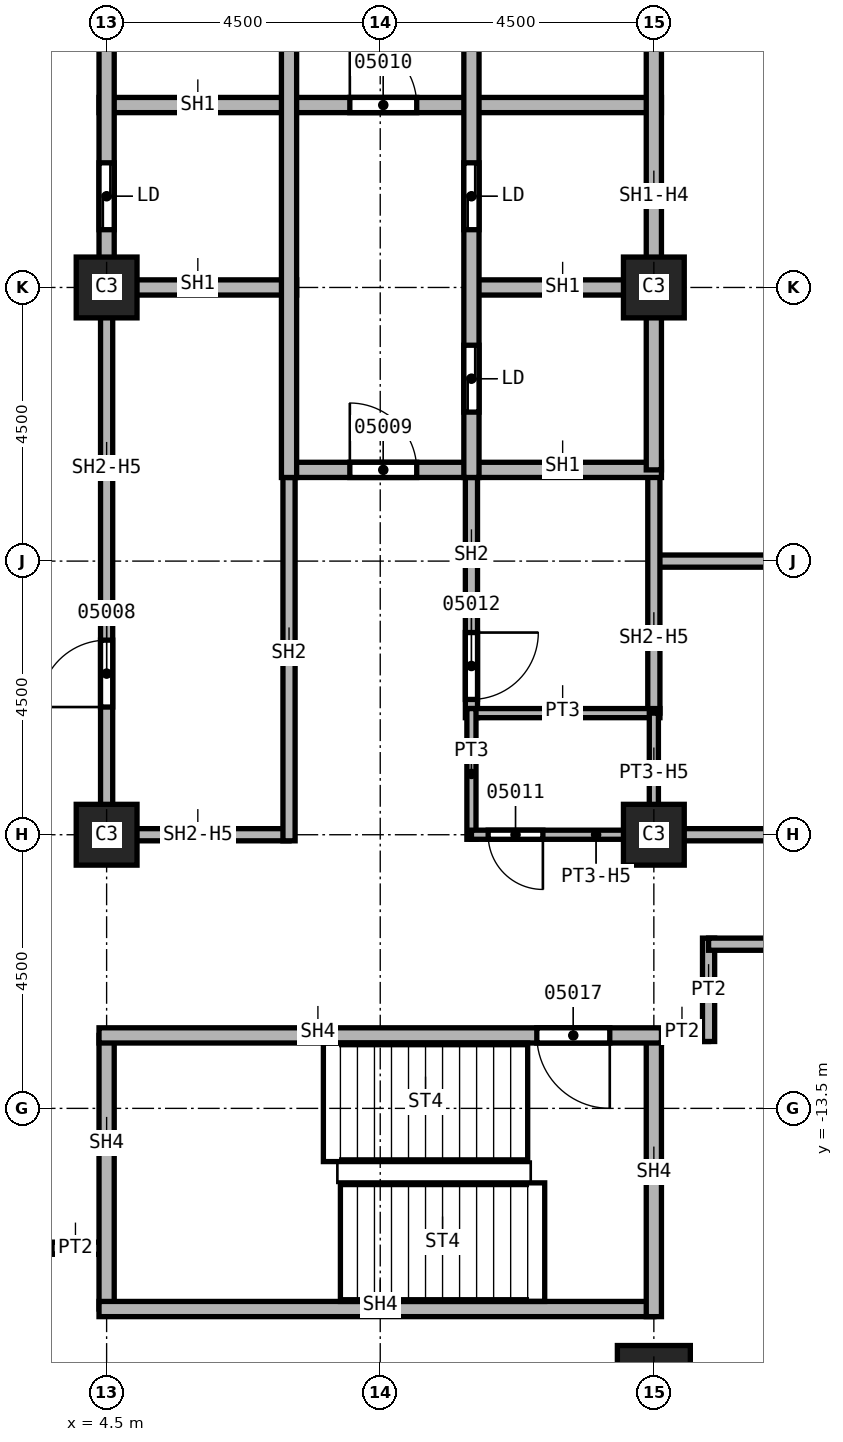
"""IFC4 building model, lengths in metres.
Left out: names, types, materials, properties, quantities, classifications, styles, units other than length and angle.
Written with IfcOpenShell. Run it as: python <this file> out.ifc"""

import sys

from ifc_helpers import new_model, si_unit, direction, frame, frame_2d, origin, origin_2d, place, context, subcontext, project, spatial, rectangle, extrude, element, fill, save


model = new_model("IFC4")
c1 = context("Model", 3, precision=1e-05, world=origin(), true_north=direction((0.0, 1.0)))
c2 = subcontext(c1, "Body", "Model", "MODEL_VIEW")
j1 = project(units=[si_unit("LENGTHUNIT", "METRE"), si_unit("PLANEANGLEUNIT", "RADIAN")], contexts=[c1])
p1 = place(None, origin())
s1 = spatial("IfcSite", under=j1, at=p1, CompositionType="ELEMENT")
p2 = place(p1, origin())
s2 = spatial("IfcBuilding", under=s1, at=p2, CompositionType="ELEMENT")
p3 = place(p2, frame((0.0, 0.0, 116.0)))
s3 = spatial("IfcBuildingStorey", under=s2, at=p3, CompositionType="ELEMENT", Elevation=116.0)
p4 = place(p3, frame((13.5, -18.0, 0.0), z_axis=(0.0, 0.0, 1.0), x_axis=(1.0, 0.0, 0.0)))
e1 = element("IfcColumn", 1, at=p4, inside=s3, PredefinedType="COLUMN", context=c2, shape_type="SweptSolid", body=[
    extrude(rectangle(XDim=1.2, YDim=1.2, at=origin_2d()), origin(), (0.0, 0.0, 1.0), 3.6),
])
for number, where, z_axis, x_axis in (
    (2, (4.5, 0.0, 0.0), (0.0, 0.0, 1.0), (1.0, 0.0, 0.0)),
    (3, (4.5, -9.0, 0.0), (0.0, 0.0, 1.0), (1.0, 0.0, 0.0)),
    (4, (13.5, 0.0, 0.0), (0.0, 0.0, 1.0), (1.0, 0.0, 0.0)),
    (5, (13.5, -9.0, 0.0), (0.0, 0.0, 1.0), (1.0, 0.0, 0.0)),
):
    element("IfcColumn", number, at=place(p3, frame(where, z_axis=z_axis, x_axis=x_axis)), inside=s3, PredefinedType="COLUMN", context=c2, shape_type="SweptSolid", body=[
        extrude(rectangle(XDim=1.0, YDim=1.0, at=origin_2d()), origin(), (0.0, 0.0, 1.0), 3.6),
    ])
p5 = place(p3, frame((4.5, -15.8, 0.0), z_axis=(0.0, 0.0, 1.0), x_axis=(-1.0, 0.0, 0.0)))
e6 = element("IfcWall", 6, at=p5, inside=s3, PredefinedType="PARTITIONING", context=c2, shape_type="SweptSolid", body=[
    extrude(rectangle(XDim=0.9, YDim=0.2, at=frame_2d((0.45, 0.0))), origin(), (0.0, 0.0, 1.0), 3.6),
])
for number, where, z_axis, x_axis in (
    (7, (13.5, -9.0, 0.0), (0.0, 0.0, 1.0), (1.0, 0.0, 0.0)),
    (8, (13.5, -4.5, 0.0), (0.0, 0.0, 1.0), (1.0, 0.0, 0.0)),
):
    element("IfcWall", number, at=place(p3, frame(where, z_axis=z_axis, x_axis=x_axis)), inside=s3, PredefinedType="PARTITIONING", context=c2, shape_type="SweptSolid", body=[
        extrude(rectangle(XDim=4.5, YDim=0.2, at=frame_2d((2.25, 0.0))), origin(), (0.0, 0.0, 1.0), 3.6),
    ])
p6 = place(p3, frame((14.4, -12.3, 0.0), z_axis=(0.0, 0.0, 1.0), x_axis=(-1.0, 0.0, 0.0)))
e9 = element("IfcWall", 9, at=p6, inside=s3, PredefinedType="PARTITIONING", context=c2, shape_type="SweptSolid", body=[
    extrude(rectangle(XDim=1.025, YDim=0.2, at=frame_2d((0.512, 0.0))), origin(), (0.0, 0.0, 1.0), 3.6),
])
p7 = place(p3, frame((14.4, -10.7, 0.0), z_axis=(0.0, 0.0, 1.0), x_axis=(0.0, -1.0, 0.0)))
e10 = element("IfcWall", 10, at=p7, inside=s3, PredefinedType="PARTITIONING", context=c2, shape_type="SweptSolid", body=[
    extrude(rectangle(XDim=1.7, YDim=0.2, at=frame_2d((0.85, 0.0))), origin(), (0.0, 0.0, 1.0), 3.6),
])
p8 = place(p3, frame((18.0, -10.8, 0.0), z_axis=(0.0, 0.0, 1.0), x_axis=(-1.0, 0.0, 0.0)))
e11 = element("IfcWall", 11, at=p8, inside=s3, PredefinedType="PARTITIONING", context=c2, shape_type="SweptSolid", body=[
    extrude(rectangle(XDim=3.6, YDim=0.2, at=frame_2d((1.8, 0.0))), origin(), (0.0, 0.0, 1.0), 3.6),
])
p9 = place(p3, frame((4.5, -9.1, 0.0), z_axis=(0.0, 0.0, 1.0), x_axis=(0.0, 1.0, 0.0)))
e12 = element("IfcWall", 12, at=p9, inside=s3, PredefinedType="SOLIDWALL", context=c2, shape_type="SweptSolid", body=[
    extrude(rectangle(XDim=9.1, YDim=0.2, at=frame_2d((4.55, 0.0))), origin(), (0.0, 0.0, 1.0), 2.838),
])
p10 = place(p9, frame((2.2, 0.0, 0.0)))
e13 = element("IfcOpeningElement", 13, at=p10, cuts=e12, PredefinedType="OPENING", context=c2, shape_type="SweptSolid", body=[
    extrude(rectangle(XDim=1.1, YDim=2.1, at=frame_2d((0.55, 1.05))), frame((0.0, 0.1, 0.0), z_axis=(0.0, -1.0, 0.0), x_axis=(1.0, 0.0, 0.0)), (0.0, 0.0, 1.0), 0.2),
])
p11 = place(p3, frame((7.5, -9.0, 0.0), z_axis=(0.0, 0.0, 1.0), x_axis=(-1.0, 0.0, 0.0)))
e14 = element("IfcWall", 14, at=p11, inside=s3, PredefinedType="SOLIDWALL", context=c2, shape_type="SweptSolid", body=[
    extrude(rectangle(XDim=3.0, YDim=0.2, at=frame_2d((1.5, 0.0))), origin(), (0.0, 0.0, 1.0), 2.838),
])
p12 = place(p3, frame((7.5, -2.875, 0.0), z_axis=(0.0, 0.0, 1.0), x_axis=(0.0, -1.0, 0.0)))
e15 = element("IfcWall", 15, at=p12, inside=s3, PredefinedType="SOLIDWALL", context=c2, shape_type="SweptSolid", body=[
    extrude(rectangle(XDim=6.225, YDim=0.2, at=frame_2d((3.113, 0.0))), origin(), (0.0, 0.0, 1.0), 3.6),
])
p13 = place(p3, frame((10.5, -2.875, 0.0), z_axis=(0.0, 0.0, 1.0), x_axis=(0.0, -1.0, 0.0)))
e16 = element("IfcWall", 16, at=p13, inside=s3, PredefinedType="SOLIDWALL", context=c2, shape_type="SweptSolid", body=[
    extrude(rectangle(XDim=4.2, YDim=0.2, at=frame_2d((2.1, 0.0))), origin(), (0.0, 0.0, 1.0), 3.6),
])
p14 = place(p13, frame((2.8, 0.0, 0.0)))
e17 = element("IfcOpeningElement", 17, at=p14, cuts=e16, PredefinedType="OPENING", context=c2, shape_type="SweptSolid", body=[
    extrude(rectangle(XDim=1.1, YDim=2.1, at=frame_2d((0.55, 1.05))), frame((0.0, 0.1, 0.0), z_axis=(0.0, -1.0, 0.0), x_axis=(1.0, 0.0, 0.0)), (0.0, 0.0, 1.0), 0.2),
])
p15 = place(p3, frame((13.5, -3.0, 0.0), z_axis=(0.0, 0.0, 1.0), x_axis=(0.0, -1.0, 0.0)))
e18 = element("IfcWall", 18, at=p15, inside=s3, PredefinedType="SOLIDWALL", context=c2, shape_type="SweptSolid", body=[
    extrude(rectangle(XDim=4.0, YDim=0.2, at=frame_2d((2.0, 0.0))), origin(), (0.0, 0.0, 1.0), 2.838),
])
p16 = place(p3, frame((4.375, 0.0, 0.0), z_axis=(0.0, 0.0, 1.0), x_axis=(1.0, 0.0, 0.0)))
e19 = element("IfcWall", 19, at=p16, inside=s3, PredefinedType="SOLIDWALL", context=c2, shape_type="SweptSolid", body=[
    extrude(rectangle(XDim=3.25, YDim=0.25, at=frame_2d((1.625, 0.0))), origin(), (0.0, 0.0, 1.0), 3.6),
])
p17 = place(p3, frame((4.375, 3.0, 0.0), z_axis=(0.0, 0.0, 1.0), x_axis=(1.0, 0.0, 0.0)))
e20 = element("IfcWall", 20, at=p17, inside=s3, PredefinedType="SOLIDWALL", context=c2, shape_type="SweptSolid", body=[
    extrude(rectangle(XDim=9.25, YDim=0.25, at=frame_2d((4.625, 0.0))), origin(), (0.0, 0.0, 1.0), 3.6),
])
p18 = place(p17, frame((4.125, 0.0, 0.0)))
e21 = element("IfcOpeningElement", 21, at=p18, cuts=e20, PredefinedType="OPENING", context=c2, shape_type="SweptSolid", body=[
    extrude(rectangle(XDim=1.1, YDim=2.1, at=frame_2d((0.55, 1.05))), frame((0.0, 0.125, 0.0), z_axis=(0.0, -1.0, 0.0), x_axis=(1.0, 0.0, 0.0)), (0.0, 0.0, 1.0), 0.25),
])
p19 = place(p3, frame((4.5, 0.0, 0.0), z_axis=(0.0, 0.0, 1.0), x_axis=(0.0, 1.0, 0.0)))
e22 = element("IfcWall", 22, at=p19, inside=s3, PredefinedType="SOLIDWALL", context=c2, shape_type="SweptSolid", body=[
    extrude(rectangle(XDim=9.125, YDim=0.25, at=frame_2d((4.562, 0.0))), origin(), (0.0, 0.0, 1.0), 2.838),
])
p20 = place(p19, frame((0.95, 0.0, 0.0)))
e23 = element("IfcOpeningElement", 23, at=p20, cuts=e22, PredefinedType="OPENING", context=c2, shape_type="SweptSolid", body=[
    extrude(rectangle(XDim=1.1, YDim=2.1, at=frame_2d((0.55, 1.05))), frame((0.0, 0.125, 0.0), z_axis=(0.0, -1.0, 0.0), x_axis=(1.0, 0.0, 0.0)), (0.0, 0.0, 1.0), 0.25),
])
p21 = place(p19, frame((3.95, 0.0, 0.0)))
e24 = element("IfcOpeningElement", 24, at=p21, cuts=e22, PredefinedType="OPENING", context=c2, shape_type="SweptSolid", body=[
    extrude(rectangle(XDim=1.1, YDim=2.1, at=frame_2d((0.55, 1.05))), frame((0.0, 0.125, 0.0), z_axis=(0.0, -1.0, 0.0), x_axis=(1.0, 0.0, 0.0)), (0.0, 0.0, 1.0), 0.25),
])
p22 = place(p19, frame((7.012, 0.0, 0.0)))
e25 = element("IfcOpeningElement", 25, at=p22, cuts=e22, PredefinedType="OPENING", context=c2, shape_type="SweptSolid", body=[
    extrude(rectangle(XDim=1.1, YDim=2.1, at=frame_2d((0.55, 1.05))), frame((0.0, 0.125, 0.0), z_axis=(0.0, -1.0, 0.0), x_axis=(1.0, 0.0, 0.0)), (0.0, 0.0, 1.0), 0.25),
])
p23 = place(p3, frame((7.5, -3.0, 0.0), z_axis=(0.0, 0.0, 1.0), x_axis=(1.0, 0.0, 0.0)))
e26 = element("IfcWall", 26, at=p23, inside=s3, PredefinedType="SOLIDWALL", context=c2, shape_type="SweptSolid", body=[
    extrude(rectangle(XDim=6.125, YDim=0.25, at=frame_2d((3.062, 0.0))), origin(), (0.0, 0.0, 1.0), 3.6),
])
p24 = place(p23, frame((1.0, 0.0, 0.0)))
e27 = element("IfcOpeningElement", 27, at=p24, cuts=e26, PredefinedType="OPENING", context=c2, shape_type="SweptSolid", body=[
    extrude(rectangle(XDim=1.1, YDim=2.1, at=frame_2d((0.55, 1.05))), frame((0.0, 0.125, 0.0), z_axis=(0.0, -1.0, 0.0), x_axis=(1.0, 0.0, 0.0)), (0.0, 0.0, 1.0), 0.25),
])
p25 = place(p3, frame((7.5, 9.125, 0.0), z_axis=(0.0, 0.0, 1.0), x_axis=(0.0, -1.0, 0.0)))
e28 = element("IfcWall", 28, at=p25, inside=s3, PredefinedType="SOLIDWALL", context=c2, shape_type="SweptSolid", body=[
    extrude(rectangle(XDim=12.25, YDim=0.25, at=frame_2d((6.125, 0.0))), origin(), (0.0, 0.0, 1.0), 3.6),
])
p26 = place(p3, frame((10.5, 0.0, 0.0), z_axis=(0.0, 0.0, 1.0), x_axis=(1.0, 0.0, 0.0)))
e29 = element("IfcWall", 29, at=p26, inside=s3, PredefinedType="SOLIDWALL", context=c2, shape_type="SweptSolid", body=[
    extrude(rectangle(XDim=3.125, YDim=0.25, at=frame_2d((1.562, 0.0))), origin(), (0.0, 0.0, 1.0), 3.6),
])
p27 = place(p3, frame((10.5, 6.125, 0.0), z_axis=(0.0, 0.0, 1.0), x_axis=(0.0, -1.0, 0.0)))
e30 = element("IfcWall", 30, at=p27, inside=s3, PredefinedType="SOLIDWALL", context=c2, shape_type="SweptSolid", body=[
    extrude(rectangle(XDim=9.25, YDim=0.25, at=frame_2d((4.625, 0.0))), origin(), (0.0, 0.0, 1.0), 3.6),
])
p28 = place(p27, frame((7.075, 0.0, 0.0)))
e31 = element("IfcOpeningElement", 31, at=p28, cuts=e30, PredefinedType="OPENING", context=c2, shape_type="SweptSolid", body=[
    extrude(rectangle(XDim=1.1, YDim=2.1, at=frame_2d((0.55, 1.05))), frame((0.0, 0.125, 0.0), z_axis=(0.0, -1.0, 0.0), x_axis=(1.0, 0.0, 0.0)), (0.0, 0.0, 1.0), 0.25),
])
p29 = place(p27, frame((4.075, 0.0, 0.0)))
e32 = element("IfcOpeningElement", 32, at=p29, cuts=e30, PredefinedType="OPENING", context=c2, shape_type="SweptSolid", body=[
    extrude(rectangle(XDim=1.1, YDim=2.1, at=frame_2d((0.55, 1.05))), frame((0.0, 0.125, 0.0), z_axis=(0.0, -1.0, 0.0), x_axis=(1.0, 0.0, 0.0)), (0.0, 0.0, 1.0), 0.25),
])
p30 = place(p3, frame((13.5, 6.0, 0.0), z_axis=(0.0, 0.0, 1.0), x_axis=(0.0, -1.0, 0.0)))
e33 = element("IfcWall", 33, at=p30, inside=s3, PredefinedType="SOLIDWALL", context=c2, shape_type="SweptSolid", body=[
    extrude(rectangle(XDim=9.0, YDim=0.25, at=frame_2d((4.5, 0.0))), origin(), (0.0, 0.0, 1.0), 2.838),
])
p31 = place(p3, frame((4.5, -16.8, 0.0), z_axis=(0.0, 0.0, 1.0), x_axis=(0.0, 1.0, 0.0)))
e34 = element("IfcWall", 34, at=p31, inside=s3, PredefinedType="SOLIDWALL", context=c2, shape_type="SweptSolid", body=[
    extrude(rectangle(XDim=4.5, YDim=0.25, at=frame_2d((2.25, 0.0))), origin(), (0.0, 0.0, 1.0), 3.6),
])
p32 = place(p3, frame((13.5, -16.8, 0.0), z_axis=(0.0, 0.0, 1.0), x_axis=(-1.0, 0.0, 0.0)))
e35 = element("IfcWall", 35, at=p32, inside=s3, PredefinedType="SOLIDWALL", context=c2, shape_type="SweptSolid", body=[
    extrude(rectangle(XDim=9.125, YDim=0.25, at=frame_2d((4.562, 0.0))), origin(), (0.0, 0.0, 1.0), 3.6),
])
p33 = place(p3, frame((13.5, -12.3, 0.0), z_axis=(0.0, 0.0, 1.0), x_axis=(0.0, -1.0, 0.0)))
e36 = element("IfcWall", 36, at=p33, inside=s3, PredefinedType="SOLIDWALL", context=c2, shape_type="SweptSolid", body=[
    extrude(rectangle(XDim=4.625, YDim=0.25, at=frame_2d((2.312, 0.0))), origin(), (0.0, 0.0, 1.0), 3.6),
])
p34 = place(p3, frame((13.625, -12.3, 0.0), z_axis=(0.0, 0.0, 1.0), x_axis=(-1.0, 0.0, 0.0)))
e37 = element("IfcWall", 37, at=p34, inside=s3, PredefinedType="SOLIDWALL", context=c2, shape_type="SweptSolid", body=[
    extrude(rectangle(XDim=9.25, YDim=0.25, at=frame_2d((4.625, 0.0))), origin(), (0.0, 0.0, 1.0), 3.6),
])
p35 = place(p34, frame((0.85, 0.0, 0.0)))
e38 = element("IfcOpeningElement", 38, at=p35, cuts=e37, PredefinedType="OPENING", context=c2, shape_type="SweptSolid", body=[
    extrude(rectangle(XDim=1.2, YDim=2.1, at=frame_2d((0.6, 1.05))), frame((0.0, 0.125, 0.0), z_axis=(0.0, -1.0, 0.0), x_axis=(1.0, 0.0, 0.0)), (0.0, 0.0, 1.0), 0.25),
])
p36 = place(p3, frame((10.5, -7.0, 0.0), z_axis=(0.0, 0.0, 1.0), x_axis=(1.0, 0.0, 0.0)))
e39 = element("IfcWall", 39, at=p36, inside=s3, PredefinedType="PARTITIONING", context=c2, shape_type="SweptSolid", body=[
    extrude(rectangle(XDim=3.1, YDim=0.15, at=frame_2d((1.55, 0.0))), origin(), (0.0, 0.0, 1.0), 3.6),
])
p37 = place(p3, frame((10.5, -6.925, 0.0), z_axis=(0.0, 0.0, 1.0), x_axis=(0.0, -1.0, 0.0)))
e40 = element("IfcWall", 40, at=p37, inside=s3, PredefinedType="PARTITIONING", context=c2, shape_type="SweptSolid", body=[
    extrude(rectangle(XDim=2.15, YDim=0.15, at=frame_2d((1.075, 0.0))), origin(), (0.0, 0.0, 1.0), 3.6),
])
p38 = place(p3, frame((13.5, -7.0, 0.0), z_axis=(0.0, 0.0, 1.0), x_axis=(0.0, -1.0, 0.0)))
e41 = element("IfcWall", 41, at=p38, inside=s3, PredefinedType="PARTITIONING", context=c2, shape_type="SweptSolid", body=[
    extrude(rectangle(XDim=2.1, YDim=0.15, at=frame_2d((1.05, 0.0))), origin(), (0.0, 0.0, 1.0), 2.838),
])
p39 = place(p3, frame((13.575, -9.0, 0.0), z_axis=(0.0, 0.0, 1.0), x_axis=(-1.0, 0.0, 0.0)))
e42 = element("IfcWall", 42, at=p39, inside=s3, PredefinedType="PARTITIONING", context=c2, shape_type="SweptSolid", body=[
    extrude(rectangle(XDim=3.075, YDim=0.15, at=frame_2d((1.538, 0.0))), origin(), (0.0, 0.0, 1.0), 2.838),
])
p40 = place(p39, frame((1.9, 0.0, 0.0)))
e43 = element("IfcOpeningElement", 43, at=p40, cuts=e42, PredefinedType="OPENING", context=c2, shape_type="SweptSolid", body=[
    extrude(rectangle(XDim=0.9, YDim=2.1, at=frame_2d((0.45, 1.05))), frame((0.0, 0.075, 0.0), z_axis=(0.0, -1.0, 0.0), x_axis=(1.0, 0.0, 0.0)), (0.0, 0.0, 1.0), 0.15),
])
p41 = place(p10, origin())
e44 = element("IfcDoor", 44, at=p41, inside=s3, OperationType="SINGLE_SWING_LEFT", PredefinedType="DOOR", context=c2, shape_type="SweptSolid", body=[
    extrude(rectangle(XDim=1.1, YDim=2.1, at=frame_2d((0.55, 1.05))), frame((0.0, 0.025, 0.0), z_axis=(0.0, -1.0, 0.0), x_axis=(1.0, 0.0, 0.0)), (0.0, 0.0, 1.0), 0.05),
])
fill(e13, e44)
p42 = place(p24, origin())
e45 = element("IfcDoor", 45, at=p42, inside=s3, OperationType="SINGLE_SWING_RIGHT", PredefinedType="DOOR", context=c2, shape_type="SweptSolid", body=[
    extrude(rectangle(XDim=1.1, YDim=2.1, at=frame_2d((0.55, 1.05))), frame((0.0, 0.025, 0.0), z_axis=(0.0, -1.0, 0.0), x_axis=(1.0, 0.0, 0.0)), (0.0, 0.0, 1.0), 0.05),
])
fill(e27, e45)
p43 = place(p18, origin())
e46 = element("IfcDoor", 46, at=p43, inside=s3, OperationType="SINGLE_SWING_LEFT", PredefinedType="DOOR", context=c2, shape_type="SweptSolid", body=[
    extrude(rectangle(XDim=1.1, YDim=2.1, at=frame_2d((0.55, 1.05))), frame((0.0, 0.025, 0.0), z_axis=(0.0, -1.0, 0.0), x_axis=(1.0, 0.0, 0.0)), (0.0, 0.0, 1.0), 0.05),
])
fill(e21, e46)
p44 = place(p40, origin())
e47 = element("IfcDoor", 47, at=p44, inside=s3, OperationType="SINGLE_SWING_RIGHT", PredefinedType="DOOR", context=c2, shape_type="SweptSolid", body=[
    extrude(rectangle(XDim=0.9, YDim=2.1, at=frame_2d((0.45, 1.05))), frame((0.0, 0.025, 0.0), z_axis=(0.0, -1.0, 0.0), x_axis=(1.0, 0.0, 0.0)), (0.0, 0.0, 1.0), 0.05),
])
fill(e43, e47)
p45 = place(p14, origin())
e48 = element("IfcDoor", 48, at=p45, inside=s3, OperationType="SINGLE_SWING_LEFT", PredefinedType="DOOR", context=c2, shape_type="SweptSolid", body=[
    extrude(rectangle(XDim=1.1, YDim=2.1, at=frame_2d((0.55, 1.05))), frame((0.0, 0.025, 0.0), z_axis=(0.0, -1.0, 0.0), x_axis=(1.0, 0.0, 0.0)), (0.0, 0.0, 1.0), 0.05),
])
fill(e17, e48)
p46 = place(p35, origin())
e49 = element("IfcDoor", 49, at=p46, inside=s3, OperationType="SINGLE_SWING_RIGHT", PredefinedType="DOOR", context=c2, shape_type="SweptSolid", body=[
    extrude(rectangle(XDim=1.2, YDim=2.1, at=frame_2d((0.6, 1.05))), frame((0.0, 0.025, 0.0), z_axis=(0.0, -1.0, 0.0), x_axis=(1.0, 0.0, 0.0)), (0.0, 0.0, 1.0), 0.05),
])
fill(e38, e49)
p47 = place(p20, origin())
e50 = element("IfcDoor", 50, at=p47, inside=s3, OperationType="SLIDING_TO_LEFT", PredefinedType="DOOR", context=c2, shape_type="SweptSolid", body=[
    extrude(rectangle(XDim=1.1, YDim=2.1, at=frame_2d((0.55, 1.05))), frame((0.0, 0.025, 0.0), z_axis=(0.0, -1.0, 0.0), x_axis=(1.0, 0.0, 0.0)), (0.0, 0.0, 1.0), 0.05),
])
fill(e23, e50)
p48 = place(p28, origin())
e51 = element("IfcDoor", 51, at=p48, inside=s3, OperationType="SLIDING_TO_LEFT", PredefinedType="DOOR", context=c2, shape_type="SweptSolid", body=[
    extrude(rectangle(XDim=1.1, YDim=2.1, at=frame_2d((0.55, 1.05))), frame((0.0, 0.025, 0.0), z_axis=(0.0, -1.0, 0.0), x_axis=(1.0, 0.0, 0.0)), (0.0, 0.0, 1.0), 0.05),
])
fill(e31, e51)
p49 = place(p29, origin())
e52 = element("IfcDoor", 52, at=p49, inside=s3, OperationType="SLIDING_TO_LEFT", PredefinedType="DOOR", context=c2, shape_type="SweptSolid", body=[
    extrude(rectangle(XDim=1.1, YDim=2.1, at=frame_2d((0.55, 1.05))), frame((0.0, 0.025, 0.0), z_axis=(0.0, -1.0, 0.0), x_axis=(1.0, 0.0, 0.0)), (0.0, 0.0, 1.0), 0.05),
])
fill(e32, e52)
save(model, sys.argv[1])
